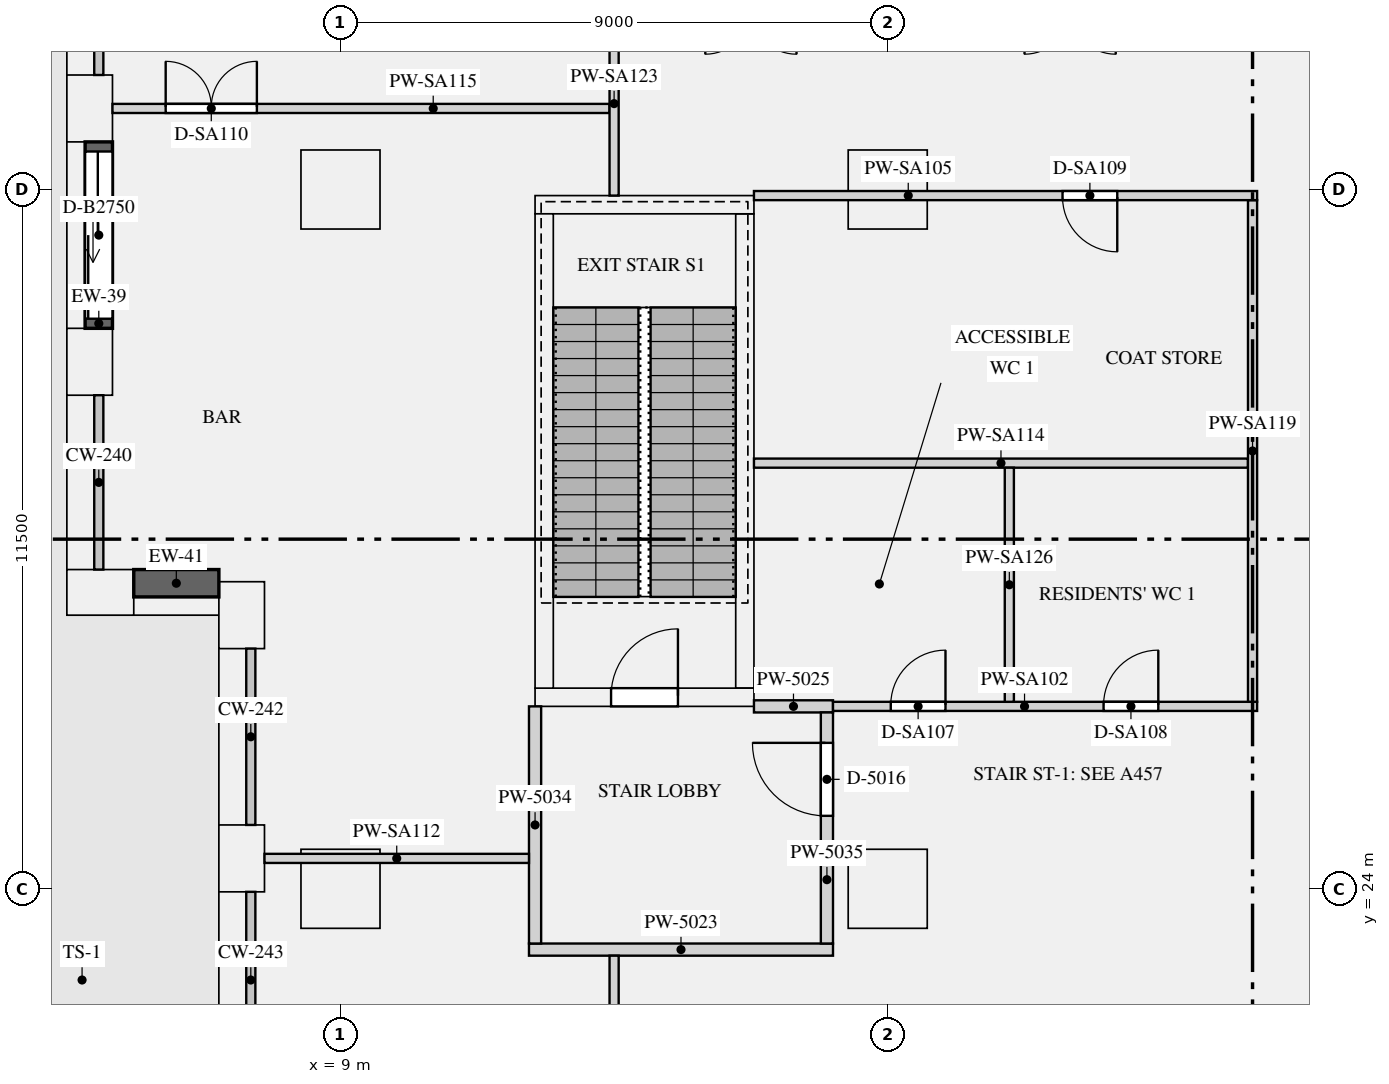
"""IFC4 building model, lengths in metres.
Left out: names, types, materials, properties, quantities, classifications, styles, units other than length and angle.
Written with IfcOpenShell. Run it as: python <this file> out.ifc"""

import sys

from ifc_helpers import new_model, si_unit, direction, frame, frame_2d, origin, origin_2d, place, context, subcontext, project, spatial, rectangle, extrude, element, fill, save


model = new_model("IFC4")
c1 = context("Model", 3, precision=1e-05, world=origin(), true_north=direction((0.0, 1.0)))
c2 = subcontext(c1, "Body", "Model", "MODEL_VIEW")
j1 = project(units=[si_unit("LENGTHUNIT", "METRE"), si_unit("PLANEANGLEUNIT", "RADIAN")], contexts=[c1])
p1 = place(None, origin())
s1 = spatial("IfcSite", under=j1, at=p1, CompositionType="ELEMENT")
p2 = place(p1, origin())
s2 = spatial("IfcBuilding", under=s1, at=p2, CompositionType="ELEMENT")
p3 = place(p2, frame((0.0, 0.0, 77.25)))
s3 = spatial("IfcBuildingStorey", under=s2, at=p3, CompositionType="ELEMENT", Elevation=77.25)
for number, where, z_axis, x_axis in (
    (1, (4.875, 36.833, 0.0), (0.0, 0.0, 1.0), (0.0, -1.0, 0.0)),
    (2, (4.875, 32.667, 0.0), (0.0, 0.0, 1.0), (0.0, -1.0, 0.0)),
    (3, (5.05, 28.875, 0.0), (0.0, 0.0, 1.0), (1.0, 0.0, 0.0)),
    (4, (7.375, 28.5, 0.0), (0.0, 0.0, 1.0), (0.0, -1.0, 0.0)),
    (5, (7.375, 24.5, 0.0), (0.0, 0.0, 1.0), (0.0, -1.0, 0.0)),
):
    element("IfcColumn", number, at=place(p3, frame(where, z_axis=z_axis, x_axis=x_axis)), inside=s3, PredefinedType="USERDEFINED", context=c2, shape_type="SweptSolid", body=[
        extrude(rectangle(XDim=1.1, YDim=0.75, at=origin_2d()), origin(), (0.0, 0.0, 1.0), 6.3),
    ])
for number, where, z_axis, x_axis in (
    (6, (9.0, 24.0, 0.0), (0.0, 0.0, 1.0), (1.0, 0.0, 0.0)),
    (7, (18.0, 24.0, 0.0), (0.0, 0.0, 1.0), (1.0, 0.0, 0.0)),
    (8, (9.0, 35.5, 0.0), (0.0, 0.0, 1.0), (1.0, 0.0, 0.0)),
    (9, (18.0, 35.5, 0.0), (0.0, 0.0, 1.0), (1.0, 0.0, 0.0)),
):
    element("IfcColumn", number, at=place(p3, frame(where, z_axis=z_axis, x_axis=x_axis)), inside=s3, PredefinedType="COLUMN", context=c2, shape_type="SweptSolid", body=[
        extrude(rectangle(XDim=1.3, YDim=1.3, at=origin_2d()), origin(), (0.0, 0.0, 1.0), 6.3),
    ])
p4 = place(p3, frame((12.2, 27.15, 0.0), z_axis=(0.0, 0.0, 1.0), x_axis=(1.0, 0.0, 0.0)))
e10 = element("IfcWall", 10, at=p4, inside=s3, PredefinedType="SHEAR", context=c2, shape_type="SweptSolid", body=[
    extrude(rectangle(XDim=3.6, YDim=0.3, at=frame_2d((1.8, 0.0))), origin(), (0.0, 0.0, 1.0), 6.3),
])
p5 = place(p4, frame((1.25, 0.0, 0.0)))
e11 = element("IfcOpeningElement", 11, at=p5, cuts=e10, PredefinedType="OPENING", context=c2, shape_type="SweptSolid", body=[
    extrude(rectangle(XDim=1.1, YDim=2.1, at=frame_2d((0.55, 1.05))), frame((0.0, 0.16, 0.0), z_axis=(0.0, -1.0, 0.0), x_axis=(1.0, 0.0, 0.0)), (0.0, 0.0, 1.0), 0.32),
])
p6 = place(p3, frame((12.2, 35.25, 0.0), z_axis=(0.0, 0.0, 1.0), x_axis=(1.0, 0.0, 0.0)))
e12 = element("IfcWall", 12, at=p6, inside=s3, PredefinedType="SHEAR", context=c2, shape_type="SweptSolid", body=[
    extrude(rectangle(XDim=3.6, YDim=0.3, at=frame_2d((1.8, 0.0))), origin(), (0.0, 0.0, 1.0), 6.3),
])
for number, where, z_axis, x_axis in (
    (13, (12.35, 27.3, 0.0), (0.0, 0.0, 1.0), (0.0, 1.0, 0.0)),
    (14, (15.65, 27.3, 0.0), (0.0, 0.0, 1.0), (0.0, 1.0, 0.0)),
):
    element("IfcWall", number, at=place(p3, frame(where, z_axis=z_axis, x_axis=x_axis)), inside=s3, PredefinedType="SHEAR", context=c2, shape_type="SweptSolid", body=[
        extrude(rectangle(XDim=7.8, YDim=0.3, at=frame_2d((3.9, 0.0))), origin(), (0.0, 0.0, 1.0), 6.3),
    ])
p7 = place(p3, frame((5.025, 36.283, 0.0), z_axis=(0.0, 0.0, 1.0), x_axis=(0.0, -1.0, 0.0)))
e15 = element("IfcWall", 15, at=p7, inside=s3, PredefinedType="SOLIDWALL", context=c2, shape_type="SweptSolid", body=[
    extrude(rectangle(XDim=3.066, YDim=0.45, at=frame_2d((1.533, 0.0))), origin(), (0.0, 0.0, 1.0), 5.98),
])
p8 = place(p7, frame((0.158, 0.0, 0.0)))
e16 = element("IfcOpeningElement", 16, at=p8, cuts=e15, PredefinedType="OPENING", context=c2, shape_type="SweptSolid", body=[
    extrude(rectangle(XDim=2.75, YDim=2.3, at=frame_2d((1.375, 1.15))), frame((0.0, 0.235, 0.0), z_axis=(0.0, -1.0, 0.0), x_axis=(1.0, 0.0, 0.0)), (0.0, 0.0, 1.0), 0.47),
])
p9 = place(p3, frame((5.6, 29.025, 0.9), z_axis=(0.0, 0.0, 1.0), x_axis=(1.0, 0.0, 0.0)))
e17 = element("IfcWall", 17, at=p9, inside=s3, PredefinedType="SOLIDWALL", context=c2, shape_type="SweptSolid", body=[
    extrude(rectangle(XDim=1.4, YDim=0.45, at=frame_2d((0.7, 0.0))), origin(), (0.0, 0.0, 1.0), 5.08),
])
p10 = place(p3, frame((12.1, 23.0, 0.0), z_axis=(0.0, 0.0, 1.0), x_axis=(1.0, 0.0, 0.0)))
e18 = element("IfcWall", 18, at=p10, inside=s3, PredefinedType="PARTITIONING", context=c2, shape_type="SweptSolid", body=[
    extrude(rectangle(XDim=5.0, YDim=0.2, at=frame_2d((2.5, 0.0))), origin(), (0.0, 0.0, 1.0), 5.98),
])
p11 = place(p3, frame((15.8, 27.0, 0.0), z_axis=(0.0, 0.0, 1.0), x_axis=(1.0, 0.0, 0.0)))
e19 = element("IfcWall", 19, at=p11, inside=s3, PredefinedType="PARTITIONING", context=c2, shape_type="SweptSolid", body=[
    extrude(rectangle(XDim=1.3, YDim=0.2, at=frame_2d((0.65, 0.0))), origin(), (0.0, 0.0, 1.0), 5.98),
])
p12 = place(p3, frame((12.2, 23.1, 0.0), z_axis=(0.0, 0.0, 1.0), x_axis=(0.0, 1.0, 0.0)))
e20 = element("IfcWall", 20, at=p12, inside=s3, PredefinedType="PARTITIONING", context=c2, shape_type="SweptSolid", body=[
    extrude(rectangle(XDim=3.9, YDim=0.2, at=frame_2d((1.95, 0.0))), origin(), (0.0, 0.0, 1.0), 5.98),
])
p13 = place(p3, frame((17.0, 23.1, 0.0), z_axis=(0.0, 0.0, 1.0), x_axis=(0.0, 1.0, 0.0)))
e21 = element("IfcWall", 21, at=p13, inside=s3, PredefinedType="PARTITIONING", context=c2, shape_type="SweptSolid", body=[
    extrude(rectangle(XDim=3.8, YDim=0.2, at=frame_2d((1.9, 0.0))), origin(), (0.0, 0.0, 1.0), 5.98),
])
p14 = place(p13, frame((2.1, 0.0, 0.0)))
e22 = element("IfcOpeningElement", 22, at=p14, cuts=e21, PredefinedType="OPENING", context=c2, shape_type="SweptSolid", body=[
    extrude(rectangle(XDim=1.2, YDim=2.1, at=frame_2d((0.6, 1.05))), frame((0.0, 0.11, 0.0), z_axis=(0.0, -1.0, 0.0), x_axis=(1.0, 0.0, 0.0)), (0.0, 0.0, 1.0), 0.22),
])
p15 = place(p3, frame((17.1, 27.0, 0.0), z_axis=(0.0, 0.0, 1.0), x_axis=(1.0, 0.0, 0.0)))
e23 = element("IfcWall", 23, at=p15, inside=s3, PredefinedType="PARTITIONING", context=c2, shape_type="SweptSolid", body=[
    extrude(rectangle(XDim=6.975, YDim=0.15, at=frame_2d((3.487, 0.0))), origin(), (0.0, 0.0, 1.0), 5.98),
])
p16 = place(p15, frame((0.95, 0.0, 0.0)))
e24 = element("IfcOpeningElement", 24, at=p16, cuts=e23, PredefinedType="OPENING", context=c2, shape_type="SweptSolid", body=[
    extrude(rectangle(XDim=0.9, YDim=2.1, at=frame_2d((0.45, 1.05))), frame((0.0, 0.085, 0.0), z_axis=(0.0, -1.0, 0.0), x_axis=(1.0, 0.0, 0.0)), (0.0, 0.0, 1.0), 0.17),
])
p17 = place(p15, frame((4.45, 0.0, 0.0)))
e25 = element("IfcOpeningElement", 25, at=p17, cuts=e23, PredefinedType="OPENING", context=c2, shape_type="SweptSolid", body=[
    extrude(rectangle(XDim=0.9, YDim=2.1, at=frame_2d((0.45, 1.05))), frame((0.0, 0.085, 0.0), z_axis=(0.0, -1.0, 0.0), x_axis=(1.0, 0.0, 0.0)), (0.0, 0.0, 1.0), 0.17),
])
p18 = place(p3, frame((15.8, 35.4, 0.0), z_axis=(0.0, 0.0, 1.0), x_axis=(1.0, 0.0, 0.0)))
e26 = element("IfcWall", 26, at=p18, inside=s3, PredefinedType="PARTITIONING", context=c2, shape_type="SweptSolid", body=[
    extrude(rectangle(XDim=8.275, YDim=0.15, at=frame_2d((4.137, 0.0))), origin(), (0.0, 0.0, 1.0), 5.98),
])
p19 = place(p18, frame((5.075, 0.0, 0.0)))
e27 = element("IfcOpeningElement", 27, at=p19, cuts=e26, PredefinedType="OPENING", context=c2, shape_type="SweptSolid", body=[
    extrude(rectangle(XDim=0.9, YDim=2.1, at=frame_2d((0.45, 1.05))), frame((0.0, 0.085, 0.0), z_axis=(0.0, -1.0, 0.0), x_axis=(1.0, 0.0, 0.0)), (0.0, 0.0, 1.0), 0.17),
])
p20 = place(p3, frame((7.75, 24.5, 0.0), z_axis=(0.0, 0.0, 1.0), x_axis=(1.0, 0.0, 0.0)))
e28 = element("IfcWall", 28, at=p20, inside=s3, PredefinedType="PARTITIONING", context=c2, shape_type="SweptSolid", body=[
    extrude(rectangle(XDim=4.35, YDim=0.15, at=frame_2d((2.175, 0.0))), origin(), (0.0, 0.0, 1.0), 5.98),
])
p21 = place(p3, frame((15.8, 31.0, 0.0), z_axis=(0.0, 0.0, 1.0), x_axis=(1.0, 0.0, 0.0)))
e29 = element("IfcWall", 29, at=p21, inside=s3, PredefinedType="PARTITIONING", context=c2, shape_type="SweptSolid", body=[
    extrude(rectangle(XDim=8.125, YDim=0.15, at=frame_2d((4.062, 0.0))), origin(), (0.0, 0.0, 1.0), 5.98),
])
p22 = place(p3, frame((5.25, 36.833, 0.0), z_axis=(0.0, 0.0, 1.0), x_axis=(1.0, 0.0, 0.0)))
e30 = element("IfcWall", 30, at=p22, inside=s3, PredefinedType="PARTITIONING", context=c2, shape_type="SweptSolid", body=[
    extrude(rectangle(XDim=8.175, YDim=0.15, at=frame_2d((4.087, 0.0))), origin(), (0.0, 0.0, 1.0), 5.98),
])
p23 = place(p22, frame((0.875, 0.0, 0.0)))
e31 = element("IfcOpeningElement", 31, at=p23, cuts=e30, PredefinedType="OPENING", context=c2, shape_type="SweptSolid", body=[
    extrude(rectangle(XDim=1.5, YDim=2.1, at=frame_2d((0.75, 1.05))), frame((0.0, 0.085, 0.0), z_axis=(0.0, -1.0, 0.0), x_axis=(1.0, 0.0, 0.0)), (0.0, 0.0, 1.0), 0.17),
])
p24 = place(p3, frame((24.0, 27.075, 0.0), z_axis=(0.0, 0.0, 1.0), x_axis=(0.0, 1.0, 0.0)))
e32 = element("IfcWall", 32, at=p24, inside=s3, PredefinedType="PARTITIONING", context=c2, shape_type="SweptSolid", body=[
    extrude(rectangle(XDim=8.25, YDim=0.15, at=frame_2d((4.125, 0.0))), origin(), (0.0, 0.0, 1.0), 5.98),
])
p25 = place(p3, frame((13.5, 12.575, 0.0), z_axis=(0.0, 0.0, 1.0), x_axis=(0.0, 1.0, 0.0)))
e33 = element("IfcWall", 33, at=p25, inside=s3, PredefinedType="PARTITIONING", context=c2, shape_type="SweptSolid", body=[
    extrude(rectangle(XDim=10.325, YDim=0.15, at=frame_2d((5.163, 0.0))), origin(), (0.0, 0.0, 1.0), 5.98),
])
p26 = place(p25, frame((1.475, 0.0, 0.0)))
e34 = element("IfcOpeningElement", 34, at=p26, cuts=e33, PredefinedType="OPENING", context=c2, shape_type="SweptSolid", body=[
    extrude(rectangle(XDim=0.9, YDim=2.1, at=frame_2d((0.45, 1.05))), frame((0.0, 0.085, 0.0), z_axis=(0.0, -1.0, 0.0), x_axis=(1.0, 0.0, 0.0)), (0.0, 0.0, 1.0), 0.17),
])
p27 = place(p25, frame((6.45, 0.0, 0.0)))
e35 = element("IfcOpeningElement", 35, at=p27, cuts=e33, PredefinedType="OPENING", context=c2, shape_type="SweptSolid", body=[
    extrude(rectangle(XDim=1.5, YDim=2.1, at=frame_2d((0.75, 1.05))), frame((0.0, 0.085, 0.0), z_axis=(0.0, -1.0, 0.0), x_axis=(1.0, 0.0, 0.0)), (0.0, 0.0, 1.0), 0.17),
])
p28 = place(p3, frame((13.5, 35.4, 0.0), z_axis=(0.0, 0.0, 1.0), x_axis=(0.0, 1.0, 0.0)))
e36 = element("IfcWall", 36, at=p28, inside=s3, PredefinedType="PARTITIONING", context=c2, shape_type="SweptSolid", body=[
    extrude(rectangle(XDim=3.025, YDim=0.15, at=frame_2d((1.513, 0.0))), origin(), (0.0, 0.0, 1.0), 5.98),
])
p29 = place(p3, frame((20.0, 27.075, 0.0), z_axis=(0.0, 0.0, 1.0), x_axis=(0.0, 1.0, 0.0)))
e37 = element("IfcWall", 37, at=p29, inside=s3, PredefinedType="PARTITIONING", context=c2, shape_type="SweptSolid", body=[
    extrude(rectangle(XDim=3.85, YDim=0.15, at=frame_2d((1.925, 0.0))), origin(), (0.0, 0.0, 1.0), 5.98),
])
p30 = place(p8, origin())
e38 = element("IfcDoor", 38, at=p30, inside=s3, OperationType="SLIDING_TO_LEFT", PredefinedType="DOOR", context=c2, shape_type="SweptSolid", body=[
    extrude(rectangle(XDim=2.75, YDim=2.3, at=frame_2d((1.375, 1.15))), frame((0.0, -0.07, 0.0), z_axis=(0.0, -1.0, 0.0), x_axis=(1.0, 0.0, 0.0)), (0.0, 0.0, 1.0), 0.05),
])
fill(e16, e38)
p31 = place(p5, origin())
e39 = element("IfcDoor", 39, at=p31, inside=s3, OperationType="SINGLE_SWING_RIGHT", PredefinedType="DOOR", context=c2, shape_type="SweptSolid", body=[
    extrude(rectangle(XDim=1.1, YDim=2.1, at=frame_2d((0.55, 1.05))), frame((0.0, 0.025, 0.0), z_axis=(0.0, -1.0, 0.0), x_axis=(1.0, 0.0, 0.0)), (0.0, 0.0, 1.0), 0.05),
])
fill(e11, e39)
p32 = place(p14, origin())
e40 = element("IfcDoor", 40, at=p32, inside=s3, OperationType="SINGLE_SWING_RIGHT", PredefinedType="DOOR", context=c2, shape_type="SweptSolid", body=[
    extrude(rectangle(XDim=1.2, YDim=2.1, at=frame_2d((0.6, 1.05))), frame((0.0, 0.025, 0.0), z_axis=(0.0, -1.0, 0.0), x_axis=(1.0, 0.0, 0.0)), (0.0, 0.0, 1.0), 0.05),
])
fill(e22, e40)
p33 = place(p16, origin())
e41 = element("IfcDoor", 41, at=p33, inside=s3, OperationType="SINGLE_SWING_RIGHT", PredefinedType="DOOR", context=c2, shape_type="SweptSolid", body=[
    extrude(rectangle(XDim=0.9, YDim=2.1, at=frame_2d((0.45, 1.05))), frame((0.0, 0.025, 0.0), z_axis=(0.0, -1.0, 0.0), x_axis=(1.0, 0.0, 0.0)), (0.0, 0.0, 1.0), 0.05),
])
fill(e24, e41)
p34 = place(p17, origin())
e42 = element("IfcDoor", 42, at=p34, inside=s3, OperationType="SINGLE_SWING_RIGHT", PredefinedType="DOOR", context=c2, shape_type="SweptSolid", body=[
    extrude(rectangle(XDim=0.9, YDim=2.1, at=frame_2d((0.45, 1.05))), frame((0.0, 0.025, 0.0), z_axis=(0.0, -1.0, 0.0), x_axis=(1.0, 0.0, 0.0)), (0.0, 0.0, 1.0), 0.05),
])
fill(e25, e42)
p35 = place(p19, frame((0.9, 0.0, 0.0), z_axis=(0.0, 0.0, 1.0), x_axis=(-1.0, 0.0, 0.0)))
e43 = element("IfcDoor", 43, at=p35, inside=s3, OperationType="SINGLE_SWING_LEFT", PredefinedType="DOOR", context=c2, shape_type="SweptSolid", body=[
    extrude(rectangle(XDim=0.9, YDim=2.1, at=frame_2d((0.45, 1.05))), frame((0.0, 0.025, 0.0), z_axis=(0.0, -1.0, 0.0), x_axis=(1.0, 0.0, 0.0)), (0.0, 0.0, 1.0), 0.05),
])
fill(e27, e43)
p36 = place(p23, origin())
e44 = element("IfcDoor", 44, at=p36, inside=s3, OperationType="DOUBLE_DOOR_SINGLE_SWING", PredefinedType="DOOR", context=c2, shape_type="SweptSolid", body=[
    extrude(rectangle(XDim=1.5, YDim=2.1, at=frame_2d((0.75, 1.05))), frame((0.0, 0.025, 0.0), z_axis=(0.0, -1.0, 0.0), x_axis=(1.0, 0.0, 0.0)), (0.0, 0.0, 1.0), 0.05),
])
fill(e31, e44)
save(model, sys.argv[1])
